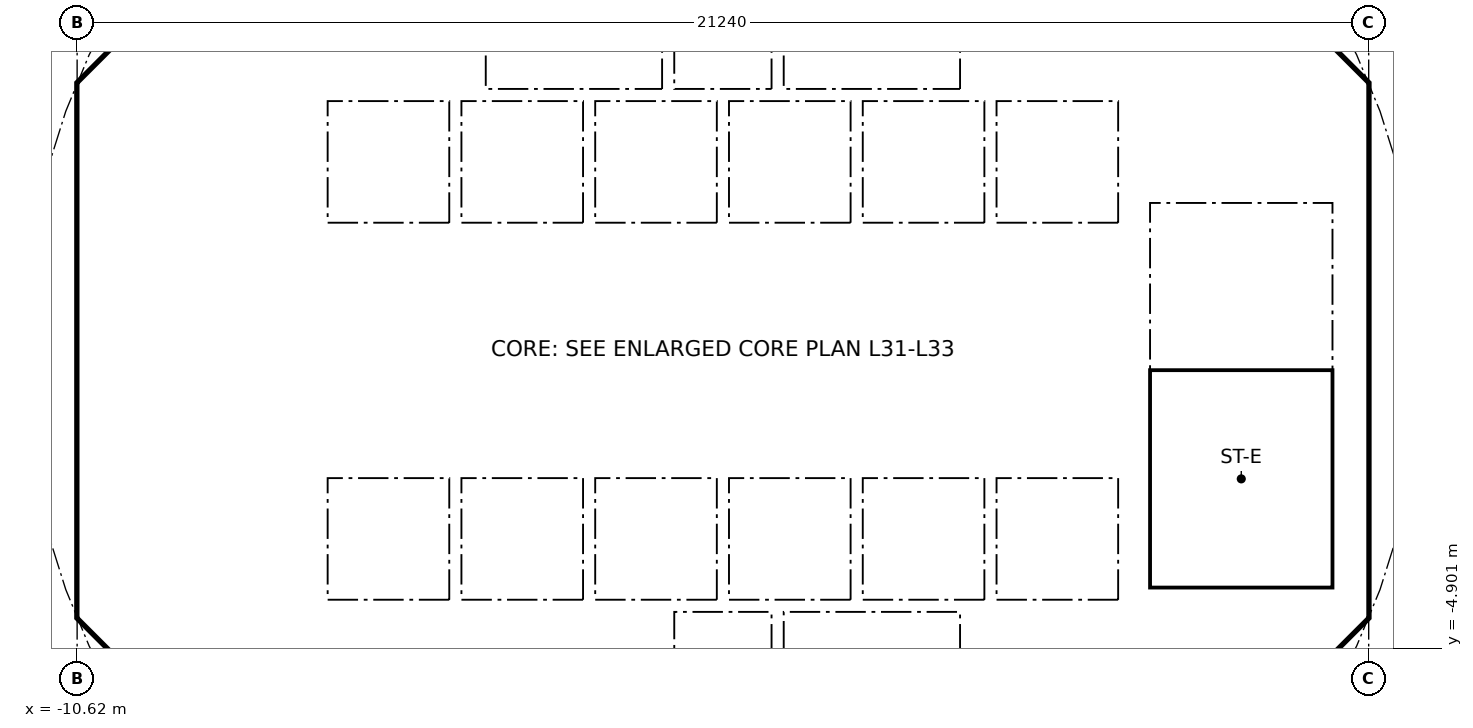
"""IFC4 building model, lengths in metres.
Left out: names, types, materials, properties, quantities, classifications, styles, units other than length and angle.
Written with IfcOpenShell. Run it as: python <this file> out.ifc"""

import sys

from ifc_helpers import new_model, si_unit, direction, frame, frame_2d, origin, place, context, subcontext, project, spatial, polyline, rectangle, outline, extrude, element, fill, save


model = new_model("IFC4")
c1 = context("Model", 3, precision=1e-05, world=origin(), true_north=direction((0.0, 1.0)))
c2 = subcontext(c1, "Body", "Model", "MODEL_VIEW")
j1 = project(units=[si_unit("LENGTHUNIT", "METRE"), si_unit("PLANEANGLEUNIT", "RADIAN")], contexts=[c1])
p1 = place(None, origin())
s1 = spatial("IfcSite", under=j1, at=p1, CompositionType="ELEMENT")
p2 = place(p1, origin())
s2 = spatial("IfcBuilding", under=s1, at=p2, CompositionType="ELEMENT")
p3 = place(p2, frame((0.0, 0.0, 130.7)))
s3 = spatial("IfcBuildingStorey", under=s2, at=p3, CompositionType="ELEMENT", Elevation=130.7)
p4 = place(p3, frame((9.988, 4.613, 0.0), z_axis=(0.0, 0.0, 1.0), x_axis=(-0.707106781187, 0.707106781187, 0.0)))
e1 = element("IfcWall", 1, at=p4, inside=s3, PredefinedType="SHEAR", context=c2, shape_type="SweptSolid", body=[
    extrude(rectangle(XDim=7.602, YDim=0.6, at=frame_2d((3.801, 0.0))), origin(), (0.0, 0.0, 1.0), 3.44),
])
p5 = place(p4, frame((3.201, 0.0, 0.0)))
e2 = element("IfcOpeningElement", 2, at=p5, cuts=e1, PredefinedType="OPENING", context=c2, shape_type="SweptSolid", body=[
    extrude(rectangle(XDim=1.2, YDim=2.1, at=frame_2d((0.6, 1.05))), frame((0.0, 0.31, 0.0), z_axis=(0.0, -1.0, 0.0), x_axis=(1.0, 0.0, 0.0)), (0.0, 0.0, 1.0), 0.62),
])
p6 = place(p3, frame((-4.613, 9.988, 0.0), z_axis=(0.0, 0.0, 1.0), x_axis=(-0.707106781187, -0.707106781187, 0.0)))
e3 = element("IfcWall", 3, at=p6, inside=s3, PredefinedType="SHEAR", context=c2, shape_type="SweptSolid", body=[
    extrude(rectangle(XDim=7.602, YDim=0.6, at=frame_2d((3.801, 0.0))), origin(), (0.0, 0.0, 1.0), 3.44),
])
p7 = place(p6, frame((0.351, 0.0, 0.0)))
e4 = element("IfcOpeningElement", 4, at=p7, cuts=e3, PredefinedType="OPENING", context=c2, shape_type="SweptSolid", body=[
    extrude(rectangle(XDim=1.1, YDim=2.1, at=frame_2d((0.55, 1.05))), frame((0.0, 0.31, 0.0), z_axis=(0.0, -1.0, 0.0), x_axis=(1.0, 0.0, 0.0)), (0.0, 0.0, 1.0), 0.62),
])
p8 = place(p3, frame((-10.325, 3.801, 0.0), z_axis=(0.0, 0.0, 1.0), x_axis=(0.0, -1.0, 0.0)))
e5 = element("IfcWall", 5, at=p8, inside=s3, PredefinedType="SHEAR", context=c2, shape_type="SweptSolid", body=[
    extrude(rectangle(XDim=7.602, YDim=0.6, at=frame_2d((3.801, 0.0))), origin(), (0.0, 0.0, 1.0), 3.44),
])
p9 = place(p8, frame((0.651, 0.0, 0.0)))
e6 = element("IfcOpeningElement", 6, at=p9, cuts=e5, PredefinedType="OPENING", context=c2, shape_type="SweptSolid", body=[
    extrude(rectangle(XDim=1.5, YDim=2.1, at=frame_2d((0.75, 1.05))), frame((0.0, 0.31, 0.0), z_axis=(0.0, -1.0, 0.0), x_axis=(1.0, 0.0, 0.0)), (0.0, 0.0, 1.0), 0.62),
])
p10 = place(p8, frame((5.451, 0.0, 0.0)))
e7 = element("IfcOpeningElement", 7, at=p10, cuts=e5, PredefinedType="OPENING", context=c2, shape_type="SweptSolid", body=[
    extrude(rectangle(XDim=1.5, YDim=2.1, at=frame_2d((0.75, 1.05))), frame((0.0, 0.31, 0.0), z_axis=(0.0, -1.0, 0.0), x_axis=(1.0, 0.0, 0.0)), (0.0, 0.0, 1.0), 0.62),
])
p11 = place(p3, frame((-9.988, -4.613, 0.0), z_axis=(0.0, 0.0, 1.0), x_axis=(0.707106781187, -0.707106781187, 0.0)))
e8 = element("IfcWall", 8, at=p11, inside=s3, PredefinedType="SHEAR", context=c2, shape_type="SweptSolid", body=[
    extrude(rectangle(XDim=7.602, YDim=0.6, at=frame_2d((3.801, 0.0))), origin(), (0.0, 0.0, 1.0), 3.44),
])
p12 = place(p11, frame((6.151, 0.0, 0.0)))
e9 = element("IfcOpeningElement", 9, at=p12, cuts=e8, PredefinedType="OPENING", context=c2, shape_type="SweptSolid", body=[
    extrude(rectangle(XDim=1.1, YDim=2.1, at=frame_2d((0.55, 1.05))), frame((0.0, 0.31, 0.0), z_axis=(0.0, -1.0, 0.0), x_axis=(1.0, 0.0, 0.0)), (0.0, 0.0, 1.0), 0.62),
])
p13 = place(p3, frame((4.613, -9.988, 0.0), z_axis=(0.0, 0.0, 1.0), x_axis=(0.707106781187, 0.707106781187, 0.0)))
e10 = element("IfcWall", 10, at=p13, inside=s3, PredefinedType="SHEAR", context=c2, shape_type="SweptSolid", body=[
    extrude(rectangle(XDim=7.602, YDim=0.6, at=frame_2d((3.801, 0.0))), origin(), (0.0, 0.0, 1.0), 3.44),
])
p14 = place(p13, frame((3.201, 0.0, 0.0)))
e11 = element("IfcOpeningElement", 11, at=p14, cuts=e10, PredefinedType="OPENING", context=c2, shape_type="SweptSolid", body=[
    extrude(rectangle(XDim=1.2, YDim=2.1, at=frame_2d((0.6, 1.05))), frame((0.0, 0.31, 0.0), z_axis=(0.0, -1.0, 0.0), x_axis=(1.0, 0.0, 0.0)), (0.0, 0.0, 1.0), 0.62),
])
p15 = place(p3, frame((-6.2, 4.3, 0.0), z_axis=(0.0, 0.0, 1.0), x_axis=(0.0, 1.0, 0.0)))
e12 = element("IfcWall", 12, at=p15, inside=s3, PredefinedType="PARTITIONING", context=c2, shape_type="SweptSolid", body=[
    extrude(rectangle(XDim=3.527, YDim=0.15, at=frame_2d((1.763, 0.0))), origin(), (0.0, 0.0, 1.0), 3.44),
])
p16 = place(p15, frame((0.262, 0.0, 0.0)))
e13 = element("IfcOpeningElement", 13, at=p16, cuts=e12, PredefinedType="OPENING", context=c2, shape_type="SweptSolid", body=[
    extrude(rectangle(XDim=0.9, YDim=2.1, at=frame_2d((0.45, 1.05))), frame((0.0, 0.085, 0.0), z_axis=(0.0, -1.0, 0.0), x_axis=(1.0, 0.0, 0.0)), (0.0, 0.0, 1.0), 0.17),
])
p17 = place(p15, frame((2.138, 0.0, 0.0)))
e14 = element("IfcOpeningElement", 14, at=p17, cuts=e12, PredefinedType="OPENING", context=c2, shape_type="SweptSolid", body=[
    extrude(rectangle(XDim=0.9, YDim=2.1, at=frame_2d((0.45, 1.05))), frame((0.0, 0.085, 0.0), z_axis=(0.0, -1.0, 0.0), x_axis=(1.0, 0.0, 0.0)), (0.0, 0.0, 1.0), 0.17),
])
p18 = place(p3, frame((4.0, 4.3, 0.0), z_axis=(0.0, 0.0, 1.0), x_axis=(0.0, 1.0, 0.0)))
e15 = element("IfcWall", 15, at=p18, inside=s3, PredefinedType="SOLIDWALL", context=c2, shape_type="SweptSolid", body=[
    extrude(rectangle(XDim=2.2, YDim=0.2, at=frame_2d((1.1, 0.0))), origin(), (0.0, 0.0, 1.0), 3.44),
])
p19 = place(p18, frame((0.55, 0.0, 0.0)))
e16 = element("IfcOpeningElement", 16, at=p19, cuts=e15, PredefinedType="OPENING", context=c2, shape_type="SweptSolid", body=[
    extrude(rectangle(XDim=1.1, YDim=2.1, at=frame_2d((0.55, 1.05))), frame((0.0, 0.11, 0.0), z_axis=(0.0, -1.0, 0.0), x_axis=(1.0, 0.0, 0.0)), (0.0, 0.0, 1.0), 0.22),
])
p20 = place(p3, frame((-4.0, 4.3, 0.0), z_axis=(0.0, 0.0, 1.0), x_axis=(0.0, 1.0, 0.0)))
e17 = element("IfcWall", 17, at=p20, inside=s3, PredefinedType="SOLIDWALL", context=c2, shape_type="SweptSolid", body=[
    extrude(rectangle(XDim=2.2, YDim=0.2, at=frame_2d((1.1, 0.0))), origin(), (0.0, 0.0, 1.0), 3.44),
])
p21 = place(p20, frame((0.55, 0.0, 0.0)))
e18 = element("IfcOpeningElement", 18, at=p21, cuts=e17, PredefinedType="OPENING", context=c2, shape_type="SweptSolid", body=[
    extrude(rectangle(XDim=1.1, YDim=2.1, at=frame_2d((0.55, 1.05))), frame((0.0, 0.11, 0.0), z_axis=(0.0, -1.0, 0.0), x_axis=(1.0, 0.0, 0.0)), (0.0, 0.0, 1.0), 0.22),
])
p22 = place(p3, frame((-6.7, 2.0, 0.0), z_axis=(0.0, 0.0, 1.0), x_axis=(1.0, 0.0, 0.0)))
e19 = element("IfcWall", 19, at=p22, inside=s3, PredefinedType="SOLIDWALL", context=c2, shape_type="SweptSolid", body=[
    extrude(rectangle(XDim=13.4, YDim=0.2, at=frame_2d((6.7, 0.0))), origin(), (0.0, 0.0, 1.0), 3.44),
])
p23 = place(p22, frame((0.65, 0.0, 0.0)))
e20 = element("IfcOpeningElement", 20, at=p23, cuts=e19, PredefinedType="OPENING", context=c2, shape_type="SweptSolid", body=[
    extrude(rectangle(XDim=1.1, YDim=2.1, at=frame_2d((0.55, 1.05))), frame((0.0, 0.11, 0.0), z_axis=(0.0, -1.0, 0.0), x_axis=(1.0, 0.0, 0.0)), (0.0, 0.0, 1.0), 0.22),
])
p24 = place(p22, frame((2.85, 0.0, 0.0)))
e21 = element("IfcOpeningElement", 21, at=p24, cuts=e19, PredefinedType="OPENING", context=c2, shape_type="SweptSolid", body=[
    extrude(rectangle(XDim=1.1, YDim=2.1, at=frame_2d((0.55, 1.05))), frame((0.0, 0.11, 0.0), z_axis=(0.0, -1.0, 0.0), x_axis=(1.0, 0.0, 0.0)), (0.0, 0.0, 1.0), 0.22),
])
p25 = place(p22, frame((5.05, 0.0, 0.0)))
e22 = element("IfcOpeningElement", 22, at=p25, cuts=e19, PredefinedType="OPENING", context=c2, shape_type="SweptSolid", body=[
    extrude(rectangle(XDim=1.1, YDim=2.1, at=frame_2d((0.55, 1.05))), frame((0.0, 0.11, 0.0), z_axis=(0.0, -1.0, 0.0), x_axis=(1.0, 0.0, 0.0)), (0.0, 0.0, 1.0), 0.22),
])
p26 = place(p3, frame((6.7, 4.0, 0.0), z_axis=(0.0, 0.0, 1.0), x_axis=(1.0, 0.0, 0.0)))
e23 = element("IfcWall", 23, at=p26, inside=s3, PredefinedType="SOLIDWALL", context=c2, shape_type="SweptSolid", body=[
    extrude(rectangle(XDim=3.325, YDim=0.2, at=frame_2d((1.662, 0.0))), origin(), (0.0, 0.0, 1.0), 3.44),
])
p27 = place(p26, frame((1.25, 0.0, 0.0)))
e24 = element("IfcOpeningElement", 24, at=p27, cuts=e23, PredefinedType="OPENING", context=c2, shape_type="SweptSolid", body=[
    extrude(rectangle(XDim=1.1, YDim=2.1, at=frame_2d((0.55, 1.05))), frame((0.0, 0.11, 0.0), z_axis=(0.0, -1.0, 0.0), x_axis=(1.0, 0.0, 0.0)), (0.0, 0.0, 1.0), 0.22),
])
p28 = place(p3, frame((-6.2, -7.827, 0.0), z_axis=(0.0, 0.0, 1.0), x_axis=(0.0, 1.0, 0.0)))
e25 = element("IfcWall", 25, at=p28, inside=s3, PredefinedType="PARTITIONING", context=c2, shape_type="SweptSolid", body=[
    extrude(rectangle(XDim=3.527, YDim=0.15, at=frame_2d((1.763, 0.0))), origin(), (0.0, 0.0, 1.0), 3.44),
])
p29 = place(p28, frame((2.365, 0.0, 0.0)))
e26 = element("IfcOpeningElement", 26, at=p29, cuts=e25, PredefinedType="OPENING", context=c2, shape_type="SweptSolid", body=[
    extrude(rectangle(XDim=0.9, YDim=2.1, at=frame_2d((0.45, 1.05))), frame((0.0, 0.085, 0.0), z_axis=(0.0, -1.0, 0.0), x_axis=(1.0, 0.0, 0.0)), (0.0, 0.0, 1.0), 0.17),
])
p30 = place(p28, frame((0.489, 0.0, 0.0)))
e27 = element("IfcOpeningElement", 27, at=p30, cuts=e25, PredefinedType="OPENING", context=c2, shape_type="SweptSolid", body=[
    extrude(rectangle(XDim=0.9, YDim=2.1, at=frame_2d((0.45, 1.05))), frame((0.0, 0.085, 0.0), z_axis=(0.0, -1.0, 0.0), x_axis=(1.0, 0.0, 0.0)), (0.0, 0.0, 1.0), 0.17),
])
p31 = place(p3, frame((4.0, -6.5, 0.0), z_axis=(0.0, 0.0, 1.0), x_axis=(0.0, 1.0, 0.0)))
e28 = element("IfcWall", 28, at=p31, inside=s3, PredefinedType="SOLIDWALL", context=c2, shape_type="SweptSolid", body=[
    extrude(rectangle(XDim=2.2, YDim=0.2, at=frame_2d((1.1, 0.0))), origin(), (0.0, 0.0, 1.0), 3.44),
])
p32 = place(p31, frame((0.55, 0.0, 0.0)))
e29 = element("IfcOpeningElement", 29, at=p32, cuts=e28, PredefinedType="OPENING", context=c2, shape_type="SweptSolid", body=[
    extrude(rectangle(XDim=1.1, YDim=2.1, at=frame_2d((0.55, 1.05))), frame((0.0, 0.11, 0.0), z_axis=(0.0, -1.0, 0.0), x_axis=(1.0, 0.0, 0.0)), (0.0, 0.0, 1.0), 0.22),
])
p33 = place(p3, frame((-4.0, -6.5, 0.0), z_axis=(0.0, 0.0, 1.0), x_axis=(0.0, 1.0, 0.0)))
e30 = element("IfcWall", 30, at=p33, inside=s3, PredefinedType="SOLIDWALL", context=c2, shape_type="SweptSolid", body=[
    extrude(rectangle(XDim=2.2, YDim=0.2, at=frame_2d((1.1, 0.0))), origin(), (0.0, 0.0, 1.0), 3.44),
])
p34 = place(p33, frame((0.65, 0.0, 0.0)))
e31 = element("IfcOpeningElement", 31, at=p34, cuts=e30, PredefinedType="OPENING", context=c2, shape_type="SweptSolid", body=[
    extrude(rectangle(XDim=0.9, YDim=2.1, at=frame_2d((0.45, 1.05))), frame((0.0, 0.11, 0.0), z_axis=(0.0, -1.0, 0.0), x_axis=(1.0, 0.0, 0.0)), (0.0, 0.0, 1.0), 0.22),
])
p35 = place(p3, frame((-6.7, -2.0, 0.0), z_axis=(0.0, 0.0, 1.0), x_axis=(1.0, 0.0, 0.0)))
e32 = element("IfcWall", 32, at=p35, inside=s3, PredefinedType="SOLIDWALL", context=c2, shape_type="SweptSolid", body=[
    extrude(rectangle(XDim=13.4, YDim=0.2, at=frame_2d((6.7, 0.0))), origin(), (0.0, 0.0, 1.0), 3.44),
])
p36 = place(p35, frame((0.65, 0.0, 0.0)))
e33 = element("IfcOpeningElement", 33, at=p36, cuts=e32, PredefinedType="OPENING", context=c2, shape_type="SweptSolid", body=[
    extrude(rectangle(XDim=1.1, YDim=2.1, at=frame_2d((0.55, 1.05))), frame((0.0, 0.11, 0.0), z_axis=(0.0, -1.0, 0.0), x_axis=(1.0, 0.0, 0.0)), (0.0, 0.0, 1.0), 0.22),
])
p37 = place(p35, frame((2.85, 0.0, 0.0)))
e34 = element("IfcOpeningElement", 34, at=p37, cuts=e32, PredefinedType="OPENING", context=c2, shape_type="SweptSolid", body=[
    extrude(rectangle(XDim=1.1, YDim=2.1, at=frame_2d((0.55, 1.05))), frame((0.0, 0.11, 0.0), z_axis=(0.0, -1.0, 0.0), x_axis=(1.0, 0.0, 0.0)), (0.0, 0.0, 1.0), 0.22),
])
p38 = place(p3, origin())
e35 = element("IfcWall", 35, at=p38, inside=s3, PredefinedType="SHEAR", context=c2, shape_type="SweptSolid", body=[
    extrude(outline(polyline([(-10.625, -3.801), (-10.025, -3.801), (-10.025, -4.152), (-9.776, -4.401), (-10.2, -4.825), (-10.625, -4.401), (-10.625, -3.801)])), origin(), (0.0, 0.0, 1.0), 3.44),
])
p39 = place(p3, origin())
e36 = element("IfcWall", 36, at=p39, inside=s3, PredefinedType="SHEAR", context=c2, shape_type="SweptSolid", body=[
    extrude(outline(polyline([(-10.2, 4.825), (-9.776, 4.401), (-10.025, 4.152), (-10.025, 3.801), (-10.625, 3.801), (-10.625, 4.401), (-10.2, 4.825)])), origin(), (0.0, 0.0, 1.0), 3.44),
])
p40 = place(p3, origin())
e37 = element("IfcWall", 37, at=p40, inside=s3, PredefinedType="SHEAR", context=c2, shape_type="SweptSolid", body=[
    extrude(outline(polyline([(9.776, -4.401), (10.025, -4.152), (10.025, -3.801), (10.025, 4.152), (9.776, 4.401), (10.2, 4.825), (10.625, 4.401), (10.625, -4.401), (10.2, -4.825), (9.776, -4.401)])), origin(), (0.0, 0.0, 1.0), 3.44),
])
for number, where, z_axis, x_axis in (
    (38, (-10.025, -4.0, 0.0), (0.0, 0.0, 1.0), (1.0, 0.0, 0.0)),
    (39, (-10.025, 4.0, 0.0), (0.0, 0.0, 1.0), (1.0, 0.0, 0.0)),
):
    element("IfcWall", number, at=place(p3, frame(where, z_axis=z_axis, x_axis=x_axis)), inside=s3, PredefinedType="PARTITIONING", context=c2, shape_type="SweptSolid", body=[
        extrude(rectangle(XDim=3.325, YDim=0.2, at=frame_2d((1.662, 0.0))), origin(), (0.0, 0.0, 1.0), 3.44),
    ])
for number, where, z_axis, x_axis in (
    (40, (-0.9, -6.5, 0.0), (0.0, 0.0, 1.0), (0.0, 1.0, 0.0)),
    (41, (0.9, -6.5, 0.0), (0.0, 0.0, 1.0), (0.0, 1.0, 0.0)),
):
    element("IfcWall", number, at=place(p3, frame(where, z_axis=z_axis, x_axis=x_axis)), inside=s3, PredefinedType="SOLIDWALL", context=c2, shape_type="SweptSolid", body=[
        extrude(rectangle(XDim=2.2, YDim=0.2, at=frame_2d((1.1, 0.0))), origin(), (0.0, 0.0, 1.0), 3.44),
    ])
p41 = place(p3, origin())
e42 = element("IfcWall", 42, at=p41, inside=s3, PredefinedType="SOLIDWALL", context=c2, shape_type="SweptSolid", body=[
    extrude(outline(polyline([(-6.7, -2.1), (-6.5, -2.1), (-6.5, -4.1), (-4.5, -4.1), (-4.5, -2.1), (-4.3, -2.1), (-4.3, -4.1), (-2.3, -4.1), (-2.3, -2.1), (-2.1, -2.1), (-2.1, -4.1), (-0.1, -4.1), (-0.1, -2.1), (0.1, -2.1), (0.1, -4.1), (2.1, -4.1), (2.1, -2.1), (2.3, -2.1), (2.3, -4.1), (4.3, -4.1), (4.3, -2.1), (4.5, -2.1), (4.5, -4.1), (6.5, -4.1), (6.5, -2.1), (6.7, -2.1), (6.7, -4.3), (-6.7, -4.3), (-6.7, -2.1)])), origin(), (0.0, 0.0, 1.0), 3.44),
])
for number, where, z_axis, x_axis in (
    (43, (-0.9, 4.3, 0.0), (0.0, 0.0, 1.0), (0.0, 1.0, 0.0)),
    (44, (0.9, 4.3, 0.0), (0.0, 0.0, 1.0), (0.0, 1.0, 0.0)),
):
    element("IfcWall", number, at=place(p3, frame(where, z_axis=z_axis, x_axis=x_axis)), inside=s3, PredefinedType="SOLIDWALL", context=c2, shape_type="SweptSolid", body=[
        extrude(rectangle(XDim=2.2, YDim=0.2, at=frame_2d((1.1, 0.0))), origin(), (0.0, 0.0, 1.0), 3.44),
    ])
p42 = place(p3, origin())
e45 = element("IfcWall", 45, at=p42, inside=s3, PredefinedType="SOLIDWALL", context=c2, shape_type="SweptSolid", body=[
    extrude(outline(polyline([(-6.5, 2.1), (-6.7, 2.1), (-6.7, 4.3), (6.7, 4.3), (6.7, 2.1), (6.5, 2.1), (6.5, 4.1), (4.5, 4.1), (4.5, 2.1), (4.3, 2.1), (4.3, 4.1), (2.3, 4.1), (2.3, 2.1), (2.1, 2.1), (2.1, 4.1), (0.1, 4.1), (0.1, 2.1), (-0.1, 2.1), (-0.1, 4.1), (-2.1, 4.1), (-2.1, 2.1), (-2.3, 2.1), (-2.3, 4.1), (-4.3, 4.1), (-4.3, 2.1), (-4.5, 2.1), (-4.5, 4.1), (-6.5, 4.1), (-6.5, 2.1)])), origin(), (0.0, 0.0, 1.0), 3.44),
])
p43 = place(p3, origin())
e46 = element("IfcWall", 46, at=p43, inside=s3, PredefinedType="SOLIDWALL", context=c2, shape_type="SweptSolid", body=[
    extrude(outline(polyline([(7.025, -3.9), (6.7, -3.9), (6.7, 3.9), (7.025, 3.9), (7.025, -3.9)])), origin(), (0.0, 0.0, 1.0), 3.44),
])
p44 = place(p3, origin())
e47 = element("IfcWall", 47, at=p44, inside=s3, PredefinedType="SOLIDWALL", context=c2, shape_type="SweptSolid", body=[
    extrude(outline(polyline([(10.025, -4.1), (6.7, -4.1), (6.7, -3.9), (10.025, -3.9), (10.025, -4.1)])), origin(), (0.0, 0.0, 1.0), 3.44),
])
p45 = place(p23, origin())
e48 = element("IfcDoor", 48, at=p45, inside=s3, OperationType="DOUBLE_DOOR_SLIDING", PredefinedType="DOOR", context=c2, shape_type="SweptSolid", body=[
    extrude(rectangle(XDim=1.1, YDim=2.1, at=frame_2d((0.55, 1.05))), frame((0.0, 0.025, 0.0), z_axis=(0.0, -1.0, 0.0), x_axis=(1.0, 0.0, 0.0)), (0.0, 0.0, 1.0), 0.05),
])
fill(e20, e48)
p46 = place(p24, origin())
e49 = element("IfcDoor", 49, at=p46, inside=s3, OperationType="DOUBLE_DOOR_SLIDING", PredefinedType="DOOR", context=c2, shape_type="SweptSolid", body=[
    extrude(rectangle(XDim=1.1, YDim=2.1, at=frame_2d((0.55, 1.05))), frame((0.0, 0.025, 0.0), z_axis=(0.0, -1.0, 0.0), x_axis=(1.0, 0.0, 0.0)), (0.0, 0.0, 1.0), 0.05),
])
fill(e21, e49)
p47 = place(p25, origin())
e50 = element("IfcDoor", 50, at=p47, inside=s3, OperationType="DOUBLE_DOOR_SLIDING", PredefinedType="DOOR", context=c2, shape_type="SweptSolid", body=[
    extrude(rectangle(XDim=1.1, YDim=2.1, at=frame_2d((0.55, 1.05))), frame((0.0, 0.025, 0.0), z_axis=(0.0, -1.0, 0.0), x_axis=(1.0, 0.0, 0.0)), (0.0, 0.0, 1.0), 0.05),
])
fill(e22, e50)
p48 = place(p36, origin())
e51 = element("IfcDoor", 51, at=p48, inside=s3, OperationType="DOUBLE_DOOR_SLIDING", PredefinedType="DOOR", context=c2, shape_type="SweptSolid", body=[
    extrude(rectangle(XDim=1.1, YDim=2.1, at=frame_2d((0.55, 1.05))), frame((0.0, 0.025, 0.0), z_axis=(0.0, -1.0, 0.0), x_axis=(1.0, 0.0, 0.0)), (0.0, 0.0, 1.0), 0.05),
])
fill(e33, e51)
p49 = place(p37, origin())
e52 = element("IfcDoor", 52, at=p49, inside=s3, OperationType="DOUBLE_DOOR_SLIDING", PredefinedType="DOOR", context=c2, shape_type="SweptSolid", body=[
    extrude(rectangle(XDim=1.1, YDim=2.1, at=frame_2d((0.55, 1.05))), frame((0.0, 0.025, 0.0), z_axis=(0.0, -1.0, 0.0), x_axis=(1.0, 0.0, 0.0)), (0.0, 0.0, 1.0), 0.05),
])
fill(e34, e52)
p50 = place(p19, origin())
e53 = element("IfcDoor", 53, at=p50, inside=s3, OperationType="DOUBLE_DOOR_SLIDING", PredefinedType="DOOR", context=c2, shape_type="SweptSolid", body=[
    extrude(rectangle(XDim=1.1, YDim=2.1, at=frame_2d((0.55, 1.05))), frame((0.0, 0.025, 0.0), z_axis=(0.0, -1.0, 0.0), x_axis=(1.0, 0.0, 0.0)), (0.0, 0.0, 1.0), 0.05),
])
fill(e16, e53)
p51 = place(p32, origin())
e54 = element("IfcDoor", 54, at=p51, inside=s3, OperationType="DOUBLE_DOOR_SLIDING", PredefinedType="DOOR", context=c2, shape_type="SweptSolid", body=[
    extrude(rectangle(XDim=1.1, YDim=2.1, at=frame_2d((0.55, 1.05))), frame((0.0, 0.025, 0.0), z_axis=(0.0, -1.0, 0.0), x_axis=(1.0, 0.0, 0.0)), (0.0, 0.0, 1.0), 0.05),
])
fill(e29, e54)
p52 = place(p21, origin())
e55 = element("IfcDoor", 55, at=p52, inside=s3, OperationType="DOUBLE_DOOR_SLIDING", PredefinedType="DOOR", context=c2, shape_type="SweptSolid", body=[
    extrude(rectangle(XDim=1.1, YDim=2.1, at=frame_2d((0.55, 1.05))), frame((0.0, 0.025, 0.0), z_axis=(0.0, -1.0, 0.0), x_axis=(1.0, 0.0, 0.0)), (0.0, 0.0, 1.0), 0.05),
])
fill(e18, e55)
p53 = place(p27, frame((1.1, 0.0, 0.0), x_axis=(-1.0, 0.0, 0.0)))
e56 = element("IfcDoor", 56, at=p53, inside=s3, OperationType="SINGLE_SWING_RIGHT", PredefinedType="DOOR", context=c2, shape_type="SweptSolid", body=[
    extrude(rectangle(XDim=1.1, YDim=2.1, at=frame_2d((0.55, 1.05))), frame((0.0, 0.025, 0.0), z_axis=(0.0, -1.0, 0.0), x_axis=(1.0, 0.0, 0.0)), (0.0, 0.0, 1.0), 0.05),
])
fill(e24, e56)
p54 = place(p16, origin())
e57 = element("IfcDoor", 57, at=p54, inside=s3, OperationType="SINGLE_SWING_RIGHT", PredefinedType="DOOR", context=c2, shape_type="SweptSolid", body=[
    extrude(rectangle(XDim=0.9, YDim=2.1, at=frame_2d((0.45, 1.05))), frame((0.0, 0.025, 0.0), z_axis=(0.0, -1.0, 0.0), x_axis=(1.0, 0.0, 0.0)), (0.0, 0.0, 1.0), 0.05),
])
fill(e13, e57)
p55 = place(p29, origin())
e58 = element("IfcDoor", 58, at=p55, inside=s3, OperationType="SINGLE_SWING_RIGHT", PredefinedType="DOOR", context=c2, shape_type="SweptSolid", body=[
    extrude(rectangle(XDim=0.9, YDim=2.1, at=frame_2d((0.45, 1.05))), frame((0.0, 0.025, 0.0), z_axis=(0.0, -1.0, 0.0), x_axis=(1.0, 0.0, 0.0)), (0.0, 0.0, 1.0), 0.05),
])
fill(e26, e58)
p56 = place(p9, origin())
e59 = element("IfcDoor", 59, at=p56, inside=s3, OperationType="DOUBLE_DOOR_SINGLE_SWING", PredefinedType="DOOR", context=c2, shape_type="SweptSolid", body=[
    extrude(rectangle(XDim=1.5, YDim=2.1, at=frame_2d((0.75, 1.05))), frame((0.0, 0.025, 0.0), z_axis=(0.0, -1.0, 0.0), x_axis=(1.0, 0.0, 0.0)), (0.0, 0.0, 1.0), 0.05),
])
fill(e6, e59)
p57 = place(p10, origin())
e60 = element("IfcDoor", 60, at=p57, inside=s3, OperationType="DOUBLE_DOOR_SINGLE_SWING", PredefinedType="DOOR", context=c2, shape_type="SweptSolid", body=[
    extrude(rectangle(XDim=1.5, YDim=2.1, at=frame_2d((0.75, 1.05))), frame((0.0, 0.025, 0.0), z_axis=(0.0, -1.0, 0.0), x_axis=(1.0, 0.0, 0.0)), (0.0, 0.0, 1.0), 0.05),
])
fill(e7, e60)
save(model, sys.argv[1])
